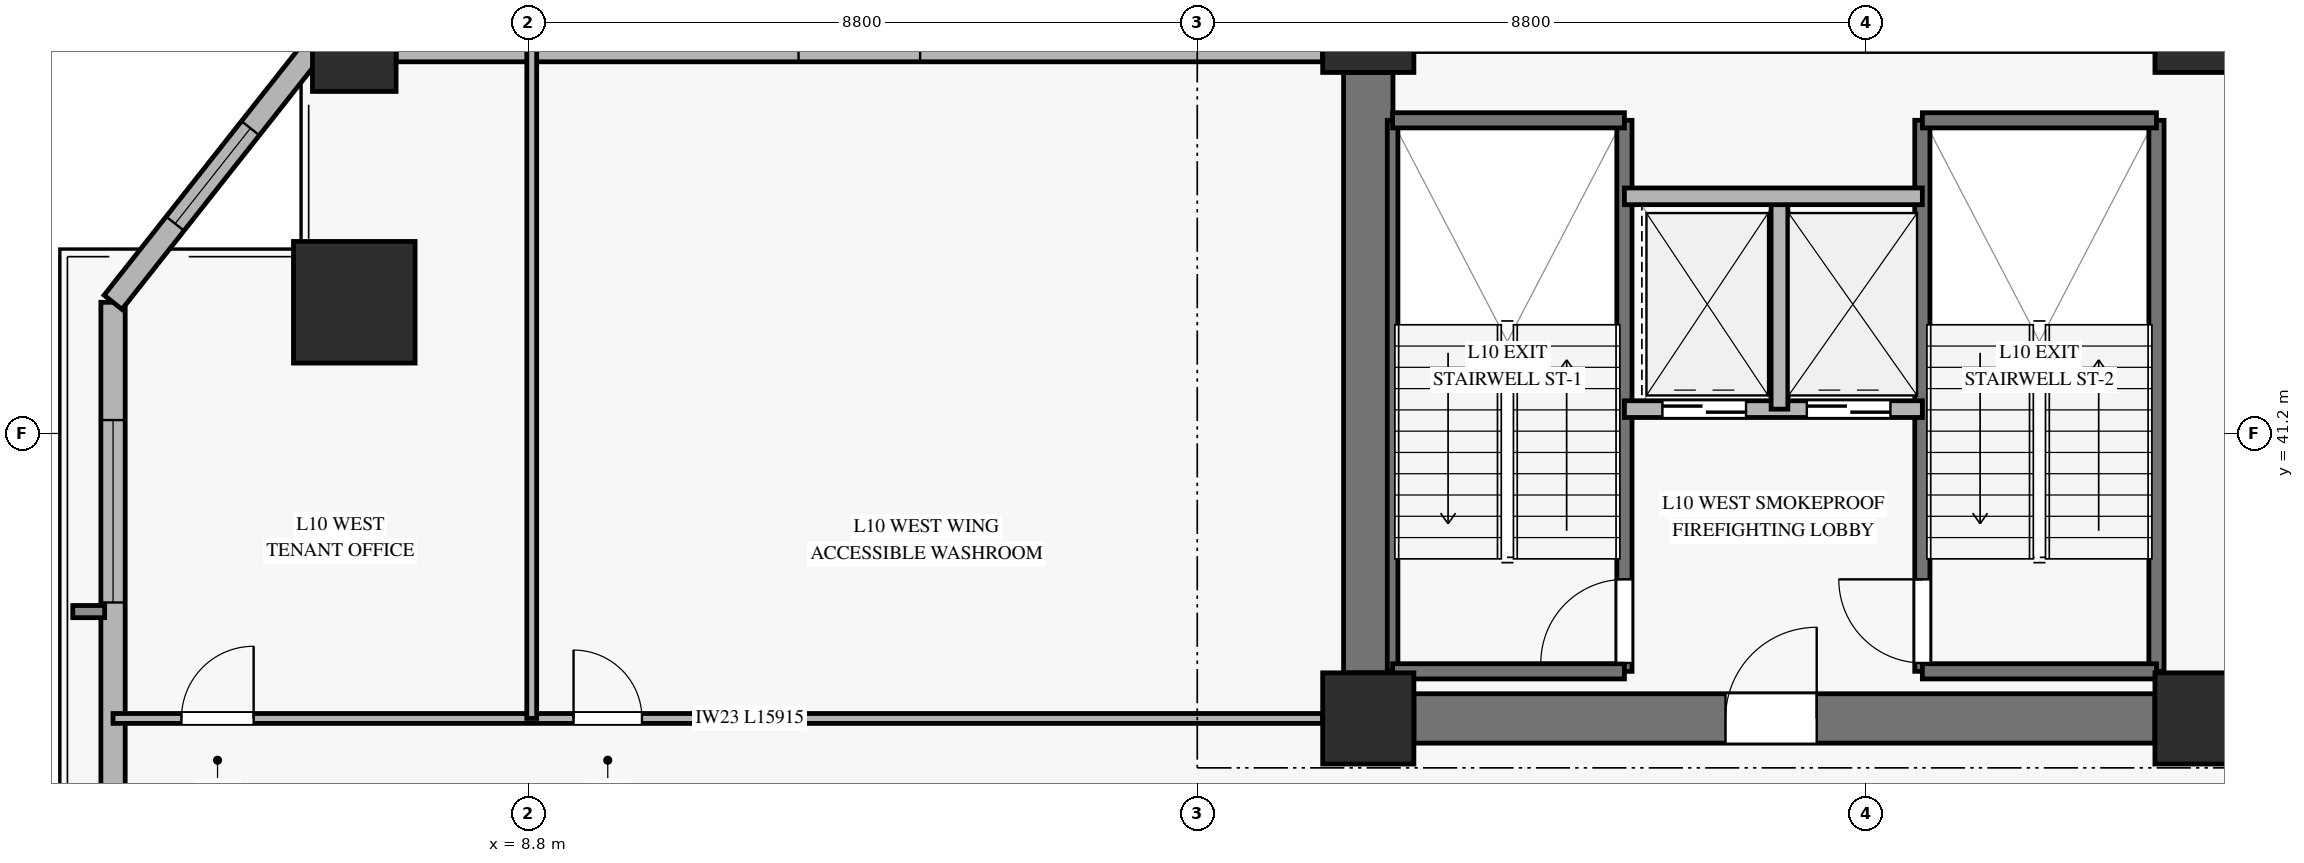
"""IFC4 building model, lengths in metres.
Left out: names, types, materials, properties, quantities, classifications, styles, units other than length and angle.
Written with IfcOpenShell. Run it as: python <this file> out.ifc"""

import sys

from ifc_helpers import new_model, si_unit, direction, frame, frame_2d, origin, origin_2d, place, context, subcontext, project, spatial, rectangle, hollow_rectangle, extrude, source, transform, mapped, element, fill, save


model = new_model("IFC4")
c1 = context("Model", 3, precision=1e-05, world=origin(), true_north=direction((0.0, 1.0)))
c2 = subcontext(c1, "Body", "Model", "MODEL_VIEW")
j1 = project(units=[si_unit("LENGTHUNIT", "METRE"), si_unit("PLANEANGLEUNIT", "RADIAN")], contexts=[c1])
p1 = place(None, origin())
s1 = spatial("IfcSite", under=j1, at=p1, CompositionType="ELEMENT")
p2 = place(p1, origin())
s2 = spatial("IfcBuilding", under=s1, at=p2, CompositionType="ELEMENT")
p3 = place(p2, frame((0.0, 0.0, 41.0)))
s3 = spatial("IfcBuildingStorey", under=s2, at=p3, CompositionType="ELEMENT", Elevation=41.0)
m1 = source(origin(), c2, "Body", "SweptSolid", [
    extrude(rectangle(XDim=1.2, YDim=1.2, at=origin_2d()), origin(), (0.0, 0.0, 1.0), 3.68),
])
for number, where, z_axis, x_axis in (
    (1, (19.85, 37.45, 0.0), (0.0, 0.0, 1.0), (1.0, 0.0, 0.0)),
    (2, (19.85, 46.55, 0.0), (0.0, 0.0, 1.0), (1.0, 0.0, 0.0)),
    (3, (30.8, 37.45, 0.0), (0.0, 0.0, 1.0), (1.0, 0.0, 0.0)),
    (4, (30.8, 46.55, 0.0), (0.0, 0.0, 1.0), (1.0, 0.0, 0.0)),
):
    element("IfcColumn", number, at=place(p3, frame(where, z_axis=z_axis, x_axis=x_axis)), inside=s3, PredefinedType="PILASTER", context=c2, shape_type="MappedRepresentation", body=[
        mapped(m1, transform((0.0, 0.0, 0.0), x_axis=(1.0, 0.0, 0.0), y_axis=(0.0, 1.0, 0.0), z_axis=(0.0, 0.0, 1.0), scale=1.0)),
    ])
p4 = place(p3, frame((20.45, 37.45, 0.0), z_axis=(0.0, 0.0, 1.0), x_axis=(1.0, 0.0, 0.0)))
e5 = element("IfcWall", 5, at=p4, inside=s3, PredefinedType="SHEAR", context=c2, shape_type="SweptSolid", body=[
    extrude(rectangle(XDim=9.75, YDim=0.65, at=frame_2d((4.875, 0.0))), origin(), (0.0, 0.0, 1.0), 3.68),
])
p5 = place(p4, frame((4.1, 0.0, 0.0)))
e6 = element("IfcOpeningElement", 6, at=p5, cuts=e5, PredefinedType="OPENING", context=c2, shape_type="SweptSolid", body=[
    extrude(rectangle(XDim=1.2, YDim=2.15, at=frame_2d((0.6, 1.075))), frame((0.0, 0.335, 0.0), z_axis=(0.0, -1.0, 0.0), x_axis=(1.0, 0.0, 0.0)), (0.0, 0.0, 1.0), 0.67),
])
p6 = place(p3, frame((19.85, 38.05, 0.0), z_axis=(0.0, 0.0, 1.0), x_axis=(0.0, 1.0, 0.0)))
e7 = element("IfcWall", 7, at=p6, inside=s3, PredefinedType="SHEAR", context=c2, shape_type="SweptSolid", body=[
    extrude(rectangle(XDim=7.9, YDim=0.65, at=frame_2d((3.95, 0.0))), origin(), (0.0, 0.0, 1.0), 3.68),
])
m2 = source(origin(), c2, "Body", "SweptSolid", [
    extrude(hollow_rectangle(XDim=1.6, YDim=1.6, WallThickness=0.075, at=origin_2d()), origin(), (0.0, 0.0, 1.0), 3.68),
])
p7 = place(p3, frame((6.509, 42.926, 0.0), z_axis=(0.0, 0.0, 1.0), x_axis=(1.0, 0.0, 0.0)))
e8 = element("IfcColumn", 8, at=p7, inside=s3, PredefinedType="COLUMN", context=c2, shape_type="MappedRepresentation", body=[
    mapped(m2, transform((0.0, 0.0, 0.0), x_axis=(1.0, 0.0, 0.0), y_axis=(0.0, 1.0, 0.0), z_axis=(0.0, 0.0, 1.0), scale=1.0)),
])
m3 = source(origin(), c2, "Body", "SweptSolid", [
    extrude(hollow_rectangle(XDim=1.1, YDim=1.1, WallThickness=0.05, at=origin_2d()), origin(), (0.0, 0.0, 1.0), 3.68),
])
p8 = place(p3, frame((6.509, 46.25, 0.0), z_axis=(0.0, 0.0, 1.0), x_axis=(1.0, 0.0, 0.0)))
e9 = element("IfcColumn", 9, at=p8, inside=s3, PredefinedType="COLUMN", context=c2, shape_type="MappedRepresentation", body=[
    mapped(m3, transform((0.0, 0.0, 0.0), x_axis=(1.0, 0.0, 0.0), y_axis=(0.0, 1.0, 0.0), z_axis=(0.0, 0.0, 1.0), scale=1.0)),
])
p9 = place(p3, frame((3.335, 25.513, 0.0), z_axis=(0.0, 0.0, 1.0), x_axis=(0.0, 1.0, 0.0)))
e10 = element("IfcWall", 10, at=p9, inside=s3, PredefinedType="SOLIDWALL", context=c2, shape_type="SweptSolid", body=[
    extrude(rectangle(XDim=17.413, YDim=0.32, at=frame_2d((8.707, 0.0))), origin(), (0.0, 0.0, 1.0), 3.16),
])
p10 = place(p9, frame((1.407, 0.0, 0.45)))
e11 = element("IfcOpeningElement", 11, at=p10, cuts=e10, PredefinedType="OPENING", context=c2, shape_type="SweptSolid", body=[
    extrude(rectangle(XDim=2.4, YDim=2.1, at=frame_2d((1.2, 1.05))), frame((0.0, 0.17, 0.0), z_axis=(0.0, -1.0, 0.0), x_axis=(1.0, 0.0, 0.0)), (0.0, 0.0, 1.0), 0.34),
])
p11 = place(p9, frame((13.463, 0.0, 0.45)))
e12 = element("IfcOpeningElement", 12, at=p11, cuts=e10, PredefinedType="OPENING", context=c2, shape_type="SweptSolid", body=[
    extrude(rectangle(XDim=2.4, YDim=2.1, at=frame_2d((1.2, 1.05))), frame((0.0, 0.17, 0.0), z_axis=(0.0, -1.0, 0.0), x_axis=(1.0, 0.0, 0.0)), (0.0, 0.0, 1.0), 0.34),
])
p12 = place(p3, frame((7.059, 46.25, 0.0), z_axis=(0.0, 0.0, 1.0), x_axis=(1.0, 0.0, 0.0)))
e13 = element("IfcWall", 13, at=p12, inside=s3, PredefinedType="SOLIDWALL", context=c2, shape_type="SweptSolid", body=[
    extrude(rectangle(XDim=12.191, YDim=0.32, at=frame_2d((6.095, 0.0))), origin(), (0.0, 0.0, 1.0), 3.16),
])
p13 = place(p12, frame((5.295, 0.0, 0.45)))
e14 = element("IfcOpeningElement", 14, at=p13, cuts=e13, PredefinedType="OPENING", context=c2, shape_type="SweptSolid", body=[
    extrude(rectangle(XDim=1.6, YDim=2.0, at=frame_2d((0.8, 1.0))), frame((0.0, 0.17, 0.0), z_axis=(0.0, -1.0, 0.0), x_axis=(1.0, 0.0, 0.0)), (0.0, 0.0, 1.0), 0.34),
])
p14 = place(p3, frame((5.959, 46.25, 0.0), z_axis=(0.0, 0.0, 1.0), x_axis=(-0.619619988795, -0.784901948963, 0.0)))
e15 = element("IfcWall", 15, at=p14, inside=s3, PredefinedType="SOLIDWALL", context=c2, shape_type="SweptSolid", body=[
    extrude(rectangle(XDim=4.235, YDim=0.3, at=frame_2d((2.117, 0.0))), origin(), (0.0, 0.0, 1.0), 3.16),
])
p15 = place(p14, frame((1.317, 0.0, 0.45)))
e16 = element("IfcOpeningElement", 16, at=p15, cuts=e15, PredefinedType="OPENING", context=c2, shape_type="SweptSolid", body=[
    extrude(rectangle(XDim=1.6, YDim=2.0, at=frame_2d((0.8, 1.0))), frame((0.0, 0.16, 0.0), z_axis=(0.0, -1.0, 0.0), x_axis=(1.0, 0.0, 0.0)), (0.0, 0.0, 1.0), 0.32),
])
p16 = place(p3, frame((20.17, 38.07, 0.0), z_axis=(0.0, 0.0, 1.0), x_axis=(0.0, 1.0, 0.0)))
e17 = element("IfcWall", 17, at=p16, inside=s3, PredefinedType="SOLIDWALL", context=c2, shape_type="SweptSolid", body=[
    extrude(rectangle(XDim=7.25, YDim=0.14, at=frame_2d((3.625, 0.0))), origin(), (0.0, 0.0, 1.0), 3.9),
])
p17 = place(p3, frame((23.22, 38.07, 0.0), z_axis=(0.0, 0.0, 1.0), x_axis=(0.0, 1.0, 0.0)))
e18 = element("IfcWall", 18, at=p17, inside=s3, PredefinedType="SOLIDWALL", context=c2, shape_type="SweptSolid", body=[
    extrude(rectangle(XDim=7.25, YDim=0.2, at=frame_2d((3.625, 0.0))), origin(), (0.0, 0.0, 1.0), 3.9),
])
p18 = place(p17, frame((0.11, 0.0, 0.0)))
e19 = element("IfcOpeningElement", 19, at=p18, cuts=e18, PredefinedType="OPENING", context=c2, shape_type="SweptSolid", body=[
    extrude(rectangle(XDim=1.1, YDim=2.15, at=frame_2d((0.55, 1.075))), frame((0.0, 0.11, 0.0), z_axis=(0.0, -1.0, 0.0), x_axis=(1.0, 0.0, 0.0)), (0.0, 0.0, 1.0), 0.22),
])
for number, where, z_axis, x_axis in (
    (20, (20.17, 45.32, 0.0), (0.0, 0.0, 1.0), (1.0, 0.0, 0.0)),
    (21, (20.17, 38.07, 0.0), (0.0, 0.0, 1.0), (1.0, 0.0, 0.0)),
):
    element("IfcWall", number, at=place(p3, frame(where, z_axis=z_axis, x_axis=x_axis)), inside=s3, PredefinedType="SOLIDWALL", context=c2, shape_type="SweptSolid", body=[
        extrude(rectangle(XDim=3.05, YDim=0.2, at=frame_2d((1.525, 0.0))), origin(), (0.0, 0.0, 1.0), 3.9),
    ])
p19 = place(p3, frame((27.14, 38.07, 0.0), z_axis=(0.0, 0.0, 1.0), x_axis=(0.0, 1.0, 0.0)))
e22 = element("IfcWall", 22, at=p19, inside=s3, PredefinedType="SOLIDWALL", context=c2, shape_type="SweptSolid", body=[
    extrude(rectangle(XDim=7.25, YDim=0.2, at=frame_2d((3.625, 0.0))), origin(), (0.0, 0.0, 1.0), 3.9),
])
p20 = place(p19, frame((0.11, 0.0, 0.0)))
e23 = element("IfcOpeningElement", 23, at=p20, cuts=e22, PredefinedType="OPENING", context=c2, shape_type="SweptSolid", body=[
    extrude(rectangle(XDim=1.1, YDim=2.15, at=frame_2d((0.55, 1.075))), frame((0.0, 0.11, 0.0), z_axis=(0.0, -1.0, 0.0), x_axis=(1.0, 0.0, 0.0)), (0.0, 0.0, 1.0), 0.22),
])
p21 = place(p3, frame((30.22, 38.07, 0.0), z_axis=(0.0, 0.0, 1.0), x_axis=(0.0, 1.0, 0.0)))
e24 = element("IfcWall", 24, at=p21, inside=s3, PredefinedType="SOLIDWALL", context=c2, shape_type="SweptSolid", body=[
    extrude(rectangle(XDim=7.25, YDim=0.2, at=frame_2d((3.625, 0.0))), origin(), (0.0, 0.0, 1.0), 3.9),
])
for number, where, z_axis, x_axis in (
    (25, (27.14, 45.32, 0.0), (0.0, 0.0, 1.0), (1.0, 0.0, 0.0)),
    (26, (27.14, 38.07, 0.0), (0.0, 0.0, 1.0), (1.0, 0.0, 0.0)),
):
    element("IfcWall", number, at=place(p3, frame(where, z_axis=z_axis, x_axis=x_axis)), inside=s3, PredefinedType="SOLIDWALL", context=c2, shape_type="SweptSolid", body=[
        extrude(rectangle(XDim=3.08, YDim=0.2, at=frame_2d((1.54, 0.0))), origin(), (0.0, 0.0, 1.0), 3.9),
    ])
p22 = place(p3, frame((23.22, 41.52, 0.0), z_axis=(0.0, 0.0, 1.0), x_axis=(1.0, 0.0, 0.0)))
e27 = element("IfcWall", 27, at=p22, inside=s3, PredefinedType="SOLIDWALL", context=c2, shape_type="SweptSolid", body=[
    extrude(rectangle(XDim=3.92, YDim=0.22, at=frame_2d((1.96, 0.0))), origin(), (0.0, 0.0, 1.0), 3.68),
])
p23 = place(p22, frame((0.5, 0.0, 0.0)))
e28 = element("IfcOpeningElement", 28, at=p23, cuts=e27, PredefinedType="OPENING", context=c2, shape_type="SweptSolid", body=[
    extrude(rectangle(XDim=1.1, YDim=2.2, at=frame_2d((0.55, 1.1))), frame((0.0, 0.12, 0.0), z_axis=(0.0, -1.0, 0.0), x_axis=(1.0, 0.0, 0.0)), (0.0, 0.0, 1.0), 0.24),
])
p24 = place(p22, frame((2.4, 0.0, 0.0)))
e29 = element("IfcOpeningElement", 29, at=p24, cuts=e27, PredefinedType="OPENING", context=c2, shape_type="SweptSolid", body=[
    extrude(rectangle(XDim=1.1, YDim=2.2, at=frame_2d((0.55, 1.1))), frame((0.0, 0.12, 0.0), z_axis=(0.0, -1.0, 0.0), x_axis=(1.0, 0.0, 0.0)), (0.0, 0.0, 1.0), 0.24),
])
p25 = place(p3, frame((25.26, 41.52, 0.0), z_axis=(0.0, 0.0, 1.0), x_axis=(0.0, 1.0, 0.0)))
e30 = element("IfcWall", 30, at=p25, inside=s3, PredefinedType="SOLIDWALL", context=c2, shape_type="SweptSolid", body=[
    extrude(rectangle(XDim=2.8, YDim=0.22, at=frame_2d((1.4, 0.0))), origin(), (0.0, 0.0, 1.0), 3.68),
])
p26 = place(p3, frame((23.22, 44.32, 0.0), z_axis=(0.0, 0.0, 1.0), x_axis=(1.0, 0.0, 0.0)))
e31 = element("IfcWall", 31, at=p26, inside=s3, PredefinedType="SOLIDWALL", context=c2, shape_type="SweptSolid", body=[
    extrude(rectangle(XDim=3.92, YDim=0.22, at=frame_2d((1.96, 0.0))), origin(), (0.0, 0.0, 1.0), 3.68),
])
p27 = place(p3, frame((3.335, 37.45, 0.0), z_axis=(0.0, 0.0, 1.0), x_axis=(1.0, 0.0, 0.0)))
e32 = element("IfcWall", 32, at=p27, inside=s3, PredefinedType="PARTITIONING", context=c2, shape_type="SweptSolid", body=[
    extrude(rectangle(XDim=15.915, YDim=0.13, at=frame_2d((7.958, 0.0))), origin(), (0.0, 0.0, 1.0), 3.165),
])
p28 = place(p27, frame((0.9, 0.0, 0.0)))
e33 = element("IfcOpeningElement", 33, at=p28, cuts=e32, PredefinedType="OPENING", context=c2, shape_type="SweptSolid", body=[
    extrude(rectangle(XDim=0.95, YDim=2.1, at=frame_2d((0.475, 1.05))), frame((0.0, 0.075, 0.0), z_axis=(0.0, -1.0, 0.0), x_axis=(1.0, 0.0, 0.0)), (0.0, 0.0, 1.0), 0.15),
])
p29 = place(p27, frame((6.059, 0.0, 0.0)))
e34 = element("IfcOpeningElement", 34, at=p29, cuts=e32, PredefinedType="OPENING", context=c2, shape_type="SweptSolid", body=[
    extrude(rectangle(XDim=0.9, YDim=2.1, at=frame_2d((0.45, 1.05))), frame((0.0, 0.075, 0.0), z_axis=(0.0, -1.0, 0.0), x_axis=(1.0, 0.0, 0.0)), (0.0, 0.0, 1.0), 0.15),
])
p30 = place(p3, frame((8.844, 37.45, 0.0), z_axis=(0.0, 0.0, 1.0), x_axis=(0.0, 1.0, 0.0)))
e35 = element("IfcWall", 35, at=p30, inside=s3, PredefinedType="PARTITIONING", context=c2, shape_type="SweptSolid", body=[
    extrude(rectangle(XDim=8.8, YDim=0.13, at=frame_2d((4.4, 0.0))), origin(), (0.0, 0.0, 1.0), 3.68),
])
m4 = source(origin(), c2, "Body", "SweptSolid", [
    extrude(rectangle(XDim=2.4, YDim=2.1, at=frame_2d((1.2, 1.05))), frame((0.0, 0.03, 0.0), z_axis=(0.0, -1.0, 0.0), x_axis=(1.0, 0.0, 0.0)), (0.0, 0.0, 1.0), 0.06),
])
p31 = place(p11, origin())
e36 = element("IfcWindow", 36, at=p31, inside=s3, PartitioningType="SINGLE_PANEL", PredefinedType="WINDOW", context=c2, shape_type="MappedRepresentation", body=[
    mapped(m4, transform((0.0, 0.0, 0.0), x_axis=(1.0, 0.0, 0.0), y_axis=(0.0, 1.0, 0.0), z_axis=(0.0, 0.0, 1.0), scale=1.0)),
])
fill(e12, e36)
m5 = source(origin(), c2, "Body", "SweptSolid", [
    extrude(rectangle(XDim=1.6, YDim=2.0, at=frame_2d((0.8, 1.0))), frame((0.0, 0.03, 0.0), z_axis=(0.0, -1.0, 0.0), x_axis=(1.0, 0.0, 0.0)), (0.0, 0.0, 1.0), 0.06),
])
p32 = place(p15, origin())
e37 = element("IfcWindow", 37, at=p32, inside=s3, PartitioningType="SINGLE_PANEL", PredefinedType="WINDOW", context=c2, shape_type="MappedRepresentation", body=[
    mapped(m5, transform((0.0, 0.0, 0.0), x_axis=(1.0, 0.0, 0.0), y_axis=(0.0, 1.0, 0.0), z_axis=(0.0, 0.0, 1.0), scale=1.0)),
])
fill(e16, e37)
m6 = source(origin(), c2, "Body", "SweptSolid", [
    extrude(rectangle(XDim=1.1, YDim=2.15, at=frame_2d((0.55, 1.075))), frame((0.0, 0.025, 0.0), z_axis=(0.0, -1.0, 0.0), x_axis=(1.0, 0.0, 0.0)), (0.0, 0.0, 1.0), 0.05),
])
p33 = place(p18, origin())
e38 = element("IfcDoor", 38, at=p33, inside=s3, OperationType="SINGLE_SWING_LEFT", PredefinedType="DOOR", context=c2, shape_type="MappedRepresentation", body=[
    mapped(m6, transform((0.0, 0.0, 0.0), x_axis=(1.0, 0.0, 0.0), y_axis=(0.0, 1.0, 0.0), z_axis=(0.0, 0.0, 1.0), scale=1.0)),
])
fill(e19, e38)
p34 = place(p20, origin())
e39 = element("IfcDoor", 39, at=p34, inside=s3, OperationType="SINGLE_SWING_RIGHT", PredefinedType="DOOR", context=c2, shape_type="MappedRepresentation", body=[
    mapped(m6, transform((0.0, 0.0, 0.0), x_axis=(1.0, 0.0, 0.0), y_axis=(0.0, 1.0, 0.0), z_axis=(0.0, 0.0, 1.0), scale=1.0)),
])
fill(e23, e39)
m7 = source(origin(), c2, "Body", "SweptSolid", [
    extrude(rectangle(XDim=1.1, YDim=2.2, at=frame_2d((0.55, 1.1))), frame((0.0, 0.025, 0.0), z_axis=(0.0, -1.0, 0.0), x_axis=(1.0, 0.0, 0.0)), (0.0, 0.0, 1.0), 0.05),
])
p35 = place(p23, origin())
e40 = element("IfcDoor", 40, at=p35, inside=s3, OperationType="SLIDING_TO_LEFT", PredefinedType="DOOR", context=c2, shape_type="MappedRepresentation", body=[
    mapped(m7, transform((0.0, 0.0, 0.0), x_axis=(1.0, 0.0, 0.0), y_axis=(0.0, 1.0, 0.0), z_axis=(0.0, 0.0, 1.0), scale=1.0)),
])
fill(e28, e40)
p36 = place(p24, origin())
e41 = element("IfcDoor", 41, at=p36, inside=s3, OperationType="SLIDING_TO_LEFT", PredefinedType="DOOR", context=c2, shape_type="MappedRepresentation", body=[
    mapped(m7, transform((0.0, 0.0, 0.0), x_axis=(1.0, 0.0, 0.0), y_axis=(0.0, 1.0, 0.0), z_axis=(0.0, 0.0, 1.0), scale=1.0)),
])
fill(e29, e41)
m8 = source(origin(), c2, "Body", "SweptSolid", [
    extrude(rectangle(XDim=1.2, YDim=2.15, at=frame_2d((0.6, 1.075))), frame((0.0, 0.025, 0.0), z_axis=(0.0, -1.0, 0.0), x_axis=(1.0, 0.0, 0.0)), (0.0, 0.0, 1.0), 0.05),
])
p37 = place(p5, origin())
e42 = element("IfcDoor", 42, at=p37, inside=s3, OperationType="SINGLE_SWING_RIGHT", PredefinedType="DOOR", context=c2, shape_type="MappedRepresentation", body=[
    mapped(m8, transform((0.0, 0.0, 0.0), x_axis=(1.0, 0.0, 0.0), y_axis=(0.0, 1.0, 0.0), z_axis=(0.0, 0.0, 1.0), scale=1.0)),
])
fill(e6, e42)
m9 = source(origin(), c2, "Body", "SweptSolid", [
    extrude(rectangle(XDim=0.95, YDim=2.1, at=frame_2d((0.475, 1.05))), frame((0.0, 0.025, 0.0), z_axis=(0.0, -1.0, 0.0), x_axis=(1.0, 0.0, 0.0)), (0.0, 0.0, 1.0), 0.05),
])
p38 = place(p28, origin())
e43 = element("IfcDoor", 43, at=p38, inside=s3, OperationType="SINGLE_SWING_RIGHT", PredefinedType="DOOR", context=c2, shape_type="MappedRepresentation", body=[
    mapped(m9, transform((0.0, 0.0, 0.0), x_axis=(1.0, 0.0, 0.0), y_axis=(0.0, 1.0, 0.0), z_axis=(0.0, 0.0, 1.0), scale=1.0)),
])
fill(e33, e43)
m10 = source(origin(), c2, "Body", "SweptSolid", [
    extrude(rectangle(XDim=0.9, YDim=2.1, at=frame_2d((0.45, 1.05))), frame((0.0, 0.025, 0.0), z_axis=(0.0, -1.0, 0.0), x_axis=(1.0, 0.0, 0.0)), (0.0, 0.0, 1.0), 0.05),
])
p39 = place(p29, origin())
e44 = element("IfcDoor", 44, at=p39, inside=s3, OperationType="SINGLE_SWING_LEFT", PredefinedType="DOOR", context=c2, shape_type="MappedRepresentation", body=[
    mapped(m10, transform((0.0, 0.0, 0.0), x_axis=(1.0, 0.0, 0.0), y_axis=(0.0, 1.0, 0.0), z_axis=(0.0, 0.0, 1.0), scale=1.0)),
])
fill(e34, e44)
save(model, sys.argv[1])
